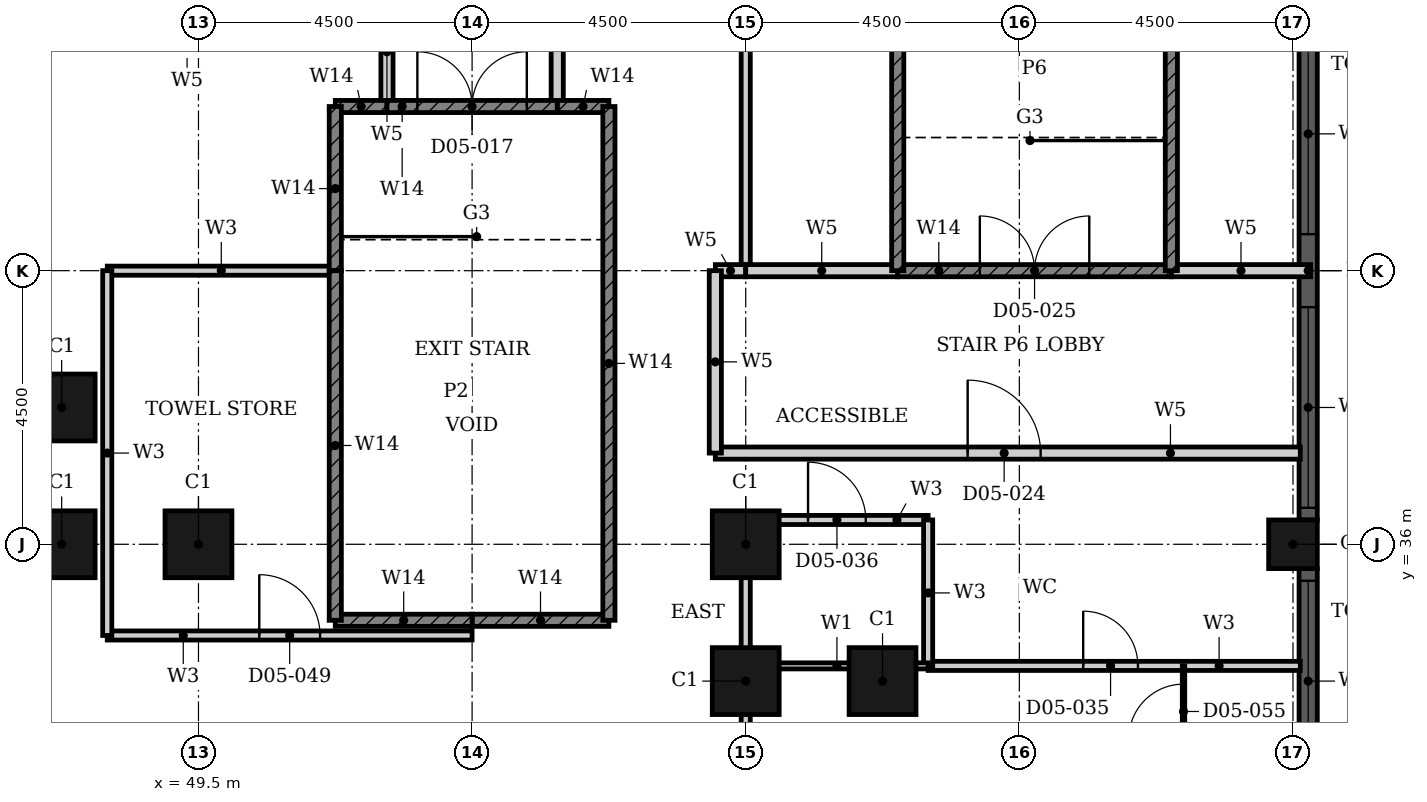
"""IFC4 building model, lengths in metres.
Left out: names, types, materials, properties, quantities, classifications, styles, units other than length and angle.
Written with IfcOpenShell. Run it as: python <this file> out.ifc"""

import sys

from ifc_helpers import new_model, si_unit, direction, frame, frame_2d, origin, origin_2d, place, context, subcontext, project, spatial, rectangle, hollow_rectangle, extrude, element, fill, save


model = new_model("IFC4")
c1 = context("Model", 3, precision=1e-05, world=origin(), true_north=direction((0.0, 1.0)))
c2 = subcontext(c1, "Body", "Model", "MODEL_VIEW")
j1 = project(units=[si_unit("LENGTHUNIT", "METRE"), si_unit("PLANEANGLEUNIT", "RADIAN")], contexts=[c1])
p1 = place(None, origin())
s1 = spatial("IfcSite", under=j1, at=p1, CompositionType="ELEMENT")
p2 = place(p1, origin())
s2 = spatial("IfcBuilding", under=s1, at=p2, CompositionType="ELEMENT")
p3 = place(p2, frame((0.0, 0.0, 28.8)))
s3 = spatial("IfcBuildingStorey", under=s2, at=p3, CompositionType="ELEMENT", Elevation=28.8)
for number, where, z_axis, x_axis in (
    (1, (60.75, 33.75, 0.0), (0.0, 0.0, 1.0), (1.0, 0.0, 0.0)),
    (2, (58.5, 33.75, 0.0), (0.0, 0.0, 1.0), (1.0, 0.0, 0.0)),
    (3, (58.5, 36.0, 0.0), (0.0, 0.0, 1.0), (1.0, 0.0, 0.0)),
    (4, (49.5, 36.0, 0.0), (0.0, 0.0, 1.0), (1.0, 0.0, 0.0)),
    (5, (47.25, 36.0, 0.0), (0.0, 0.0, 1.0), (1.0, 0.0, 0.0)),
    (6, (47.25, 38.25, 0.0), (0.0, 0.0, 1.0), (1.0, 0.0, 0.0)),
):
    element("IfcColumn", number, at=place(p3, frame(where, z_axis=z_axis, x_axis=x_axis)), inside=s3, PredefinedType="COLUMN", context=c2, shape_type="SweptSolid", body=[
        extrude(hollow_rectangle(XDim=1.1, YDim=1.1, WallThickness=0.036, at=origin_2d()), origin(), (0.0, 0.0, 1.0), 4.8),
    ])
p4 = place(p3, frame((67.5, 36.0, 0.0), z_axis=(0.0, 0.0, 1.0), x_axis=(1.0, 0.0, 0.0)))
e7 = element("IfcColumn", 7, at=p4, inside=s3, PredefinedType="COLUMN", context=c2, shape_type="SweptSolid", body=[
    extrude(hollow_rectangle(XDim=0.8, YDim=0.8, WallThickness=0.025, at=origin_2d()), origin(), (0.0, 0.0, 1.0), 4.5),
])
p5 = place(p3, frame((67.75, 27.4, 0.0), z_axis=(0.0, 0.0, 1.0), x_axis=(0.0, 1.0, 0.0)))
e8 = element("IfcWall", 8, at=p5, inside=s3, PredefinedType="SOLIDWALL", context=c2, shape_type="SweptSolid", body=[
    extrude(rectangle(XDim=8.2, YDim=0.3, at=frame_2d((4.1, 0.0))), origin(), (0.0, 0.0, 1.0), 4.8),
])
p6 = place(p5, frame((0.2, 0.0, 0.9)))
e9 = element("IfcOpeningElement", 9, at=p6, cuts=e8, PredefinedType="OPENING", context=c2, shape_type="SweptSolid", body=[
    extrude(rectangle(XDim=3.3, YDim=2.9, at=frame_2d((1.65, 1.45))), frame((0.0, 0.16, 0.0), z_axis=(0.0, -1.0, 0.0), x_axis=(1.0, 0.0, 0.0)), (0.0, 0.0, 1.0), 0.32),
])
p7 = place(p5, frame((4.7, 0.0, 0.9)))
e10 = element("IfcOpeningElement", 10, at=p7, cuts=e8, PredefinedType="OPENING", context=c2, shape_type="SweptSolid", body=[
    extrude(rectangle(XDim=3.3, YDim=2.9, at=frame_2d((1.65, 1.45))), frame((0.0, 0.16, 0.0), z_axis=(0.0, -1.0, 0.0), x_axis=(1.0, 0.0, 0.0)), (0.0, 0.0, 1.0), 0.32),
])
p8 = place(p3, frame((67.75, 36.4, 0.0), z_axis=(0.0, 0.0, 1.0), x_axis=(0.0, 1.0, 0.0)))
e11 = element("IfcWall", 11, at=p8, inside=s3, PredefinedType="SOLIDWALL", context=c2, shape_type="SweptSolid", body=[
    extrude(rectangle(XDim=8.2, YDim=0.3, at=frame_2d((4.1, 0.0))), origin(), (0.0, 0.0, 1.0), 4.8),
])
p9 = place(p8, frame((0.2, 0.0, 0.9)))
e12 = element("IfcOpeningElement", 12, at=p9, cuts=e11, PredefinedType="OPENING", context=c2, shape_type="SweptSolid", body=[
    extrude(rectangle(XDim=3.3, YDim=2.9, at=frame_2d((1.65, 1.45))), frame((0.0, 0.16, 0.0), z_axis=(0.0, -1.0, 0.0), x_axis=(1.0, 0.0, 0.0)), (0.0, 0.0, 1.0), 0.32),
])
p10 = place(p8, frame((4.7, 0.0, 0.9)))
e13 = element("IfcOpeningElement", 13, at=p10, cuts=e11, PredefinedType="OPENING", context=c2, shape_type="SweptSolid", body=[
    extrude(rectangle(XDim=3.3, YDim=2.9, at=frame_2d((1.65, 1.45))), frame((0.0, 0.16, 0.0), z_axis=(0.0, -1.0, 0.0), x_axis=(1.0, 0.0, 0.0)), (0.0, 0.0, 1.0), 0.32),
])
p11 = place(p3, frame((61.5, 34.0, 0.0), z_axis=(0.0, 0.0, 1.0), x_axis=(1.0, 0.0, 0.0)))
e14 = element("IfcWall", 14, at=p11, inside=s3, PredefinedType="PARTITIONING", context=c2, shape_type="SweptSolid", body=[
    extrude(rectangle(XDim=6.12, YDim=0.15, at=frame_2d((3.06, 0.0))), origin(), (0.0, 0.0, 1.0), 4.5),
])
p12 = place(p11, frame((2.55, 0.0, 0.0)))
e15 = element("IfcOpeningElement", 15, at=p12, cuts=e14, PredefinedType="OPENING", context=c2, shape_type="SweptSolid", body=[
    extrude(rectangle(XDim=0.9, YDim=2.1, at=frame_2d((0.45, 1.05))), frame((0.0, 0.085, 0.0), z_axis=(0.0, -1.0, 0.0), x_axis=(1.0, 0.0, 0.0)), (0.0, 0.0, 1.0), 0.17),
])
p13 = place(p3, frame((48.0, 34.5, 0.0), z_axis=(0.0, 0.0, 1.0), x_axis=(1.0, 0.0, 0.0)))
e16 = element("IfcWall", 16, at=p13, inside=s3, PredefinedType="PARTITIONING", context=c2, shape_type="SweptSolid", body=[
    extrude(rectangle(XDim=6.0, YDim=0.15, at=frame_2d((3.0, 0.0))), origin(), (0.0, 0.0, 1.0), 4.5),
])
p14 = place(p13, frame((2.5, 0.0, 0.0)))
e17 = element("IfcOpeningElement", 17, at=p14, cuts=e16, PredefinedType="OPENING", context=c2, shape_type="SweptSolid", body=[
    extrude(rectangle(XDim=1.0, YDim=2.1, at=frame_2d((0.5, 1.05))), frame((0.0, 0.085, 0.0), z_axis=(0.0, -1.0, 0.0), x_axis=(1.0, 0.0, 0.0)), (0.0, 0.0, 1.0), 0.17),
])
p15 = place(p3, frame((58.5, 36.4, 0.0), z_axis=(0.0, 0.0, 1.0), x_axis=(1.0, 0.0, 0.0)))
e18 = element("IfcWall", 18, at=p15, inside=s3, PredefinedType="PARTITIONING", context=c2, shape_type="SweptSolid", body=[
    extrude(rectangle(XDim=3.0, YDim=0.15, at=frame_2d((1.5, 0.0))), origin(), (0.0, 0.0, 1.0), 4.5),
])
p16 = place(p15, frame((1.025, 0.0, 0.0)))
e19 = element("IfcOpeningElement", 19, at=p16, cuts=e18, PredefinedType="OPENING", context=c2, shape_type="SweptSolid", body=[
    extrude(rectangle(XDim=0.95, YDim=2.1, at=frame_2d((0.475, 1.05))), frame((0.0, 0.085, 0.0), z_axis=(0.0, -1.0, 0.0), x_axis=(1.0, 0.0, 0.0)), (0.0, 0.0, 1.0), 0.17),
])
p17 = place(p3, frame((48.0, 40.5, 0.0), z_axis=(0.0, 0.0, 1.0), x_axis=(1.0, 0.0, 0.0)))
e20 = element("IfcWall", 20, at=p17, inside=s3, PredefinedType="PARTITIONING", context=c2, shape_type="SweptSolid", body=[
    extrude(rectangle(XDim=3.75, YDim=0.15, at=frame_2d((1.875, 0.0))), origin(), (0.0, 0.0, 1.0), 4.5),
])
p18 = place(p3, frame((48.0, 34.5, 0.0), z_axis=(0.0, 0.0, 1.0), x_axis=(0.0, 1.0, 0.0)))
e21 = element("IfcWall", 21, at=p18, inside=s3, PredefinedType="PARTITIONING", context=c2, shape_type="SweptSolid", body=[
    extrude(rectangle(XDim=6.0, YDim=0.15, at=frame_2d((3.0, 0.0))), origin(), (0.0, 0.0, 1.0), 4.5),
])
p19 = place(p3, frame((58.5, 29.5, 0.0), z_axis=(0.0, 0.0, 1.0), x_axis=(0.0, 1.0, 0.0)))
e22 = element("IfcWall", 22, at=p19, inside=s3, PredefinedType="PARTITIONING", context=c2, shape_type="SweptSolid", body=[
    extrude(rectangle(XDim=4.5, YDim=0.15, at=frame_2d((2.25, 0.0))), origin(), (0.0, 0.0, 1.0), 4.5),
])
p20 = place(p3, frame((58.5, 34.0, 0.0), z_axis=(0.0, 0.0, 1.0), x_axis=(0.0, 1.0, 0.0)))
e23 = element("IfcWall", 23, at=p20, inside=s3, PredefinedType="PARTITIONING", context=c2, shape_type="SweptSolid", body=[
    extrude(rectangle(XDim=2.4, YDim=0.15, at=frame_2d((1.2, 0.0))), origin(), (0.0, 0.0, 1.0), 3.88),
])
p21 = place(p3, frame((58.5, 40.5, 0.0), z_axis=(0.0, 0.0, 1.0), x_axis=(0.0, 1.0, 0.0)))
e24 = element("IfcWall", 24, at=p21, inside=s3, PredefinedType="PARTITIONING", context=c2, shape_type="SweptSolid", body=[
    extrude(rectangle(XDim=13.69, YDim=0.15, at=frame_2d((6.845, 0.0))), origin(), (0.0, 0.0, 1.0), 4.5),
])
p22 = place(p21, frame((6.25, 0.0, 0.0)))
e25 = element("IfcOpeningElement", 25, at=p22, cuts=e24, PredefinedType="OPENING", context=c2, shape_type="SweptSolid", body=[
    extrude(rectangle(XDim=1.0, YDim=2.1, at=frame_2d((0.5, 1.05))), frame((0.0, 0.085, 0.0), z_axis=(0.0, -1.0, 0.0), x_axis=(1.0, 0.0, 0.0)), (0.0, 0.0, 1.0), 0.17),
])
p23 = place(p3, frame((61.5, 34.0, 0.0), z_axis=(0.0, 0.0, 1.0), x_axis=(0.0, 1.0, 0.0)))
e26 = element("IfcWall", 26, at=p23, inside=s3, PredefinedType="PARTITIONING", context=c2, shape_type="SweptSolid", body=[
    extrude(rectangle(XDim=2.4, YDim=0.15, at=frame_2d((1.2, 0.0))), origin(), (0.0, 0.0, 1.0), 4.5),
])
p24 = place(p3, frame((58.5, 34.0, 0.0), z_axis=(0.0, 0.0, 1.0), x_axis=(1.0, 0.0, 0.0)))
e27 = element("IfcWall", 27, at=p24, inside=s3, PredefinedType="PARTITIONING", context=c2, shape_type="SweptSolid", body=[
    extrude(rectangle(XDim=3.0, YDim=0.1, at=frame_2d((1.5, 0.0))), origin(), (0.0, 0.0, 1.0), 4.5),
])
p25 = place(p3, frame((58.0, 37.5, 0.0), z_axis=(0.0, 0.0, 1.0), x_axis=(1.0, 0.0, 0.0)))
e28 = element("IfcWall", 28, at=p25, inside=s3, PredefinedType="PARTITIONING", context=c2, shape_type="SweptSolid", body=[
    extrude(rectangle(XDim=9.62, YDim=0.2, at=frame_2d((4.81, 0.0))), origin(), (0.0, 0.0, 1.0), 4.5),
])
p26 = place(p25, frame((4.15, 0.0, 0.0)))
e29 = element("IfcOpeningElement", 29, at=p26, cuts=e28, PredefinedType="OPENING", context=c2, shape_type="SweptSolid", body=[
    extrude(rectangle(XDim=1.2, YDim=2.1, at=frame_2d((0.6, 1.05))), frame((0.0, 0.11, 0.0), z_axis=(0.0, -1.0, 0.0), x_axis=(1.0, 0.0, 0.0)), (0.0, 0.0, 1.0), 0.22),
])
p27 = place(p3, frame((58.0, 40.5, 0.0), z_axis=(0.0, 0.0, 1.0), x_axis=(1.0, 0.0, 0.0)))
e30 = element("IfcWall", 30, at=p27, inside=s3, PredefinedType="PARTITIONING", context=c2, shape_type="SweptSolid", body=[
    extrude(rectangle(XDim=0.5, YDim=0.2, at=frame_2d((0.25, 0.0))), origin(), (0.0, 0.0, 1.0), 4.5),
])
p28 = place(p3, frame((58.5, 40.5, 0.0), z_axis=(0.0, 0.0, 1.0), x_axis=(1.0, 0.0, 0.0)))
e31 = element("IfcWall", 31, at=p28, inside=s3, PredefinedType="PARTITIONING", context=c2, shape_type="SweptSolid", body=[
    extrude(rectangle(XDim=2.5, YDim=0.2, at=frame_2d((1.25, 0.0))), origin(), (0.0, 0.0, 1.0), 4.5),
])
p29 = place(p3, frame((65.5, 40.5, 0.0), z_axis=(0.0, 0.0, 1.0), x_axis=(1.0, 0.0, 0.0)))
e32 = element("IfcWall", 32, at=p29, inside=s3, PredefinedType="PARTITIONING", context=c2, shape_type="SweptSolid", body=[
    extrude(rectangle(XDim=2.29, YDim=0.2, at=frame_2d((1.145, 0.0))), origin(), (0.0, 0.0, 1.0), 4.5),
])
p30 = place(p3, frame((52.6, 43.2, 0.0), z_axis=(0.0, 0.0, 1.0), x_axis=(0.0, 1.0, 0.0)))
e33 = element("IfcWall", 33, at=p30, inside=s3, PredefinedType="PARTITIONING", context=c2, shape_type="SweptSolid", body=[
    extrude(rectangle(XDim=1.8, YDim=0.2, at=frame_2d((0.9, 0.0))), origin(), (0.0, 0.0, 1.0), 4.5),
])
p31 = place(p3, frame((55.4, 43.2, 0.0), z_axis=(0.0, 0.0, 1.0), x_axis=(0.0, 1.0, 0.0)))
e34 = element("IfcWall", 34, at=p31, inside=s3, PredefinedType="PARTITIONING", context=c2, shape_type="SweptSolid", body=[
    extrude(rectangle(XDim=10.92, YDim=0.2, at=frame_2d((5.46, 0.0))), origin(), (0.0, 0.0, 1.0), 4.5),
])
p32 = place(p31, frame((4.8, 0.0, 0.0)))
e35 = element("IfcOpeningElement", 35, at=p32, cuts=e34, PredefinedType="OPENING", context=c2, shape_type="SweptSolid", body=[
    extrude(rectangle(XDim=1.2, YDim=2.1, at=frame_2d((0.6, 1.05))), frame((0.0, 0.11, 0.0), z_axis=(0.0, -1.0, 0.0), x_axis=(1.0, 0.0, 0.0)), (0.0, 0.0, 1.0), 0.22),
])
p33 = place(p3, frame((58.0, 37.5, 0.0), z_axis=(0.0, 0.0, 1.0), x_axis=(0.0, 1.0, 0.0)))
e36 = element("IfcWall", 36, at=p33, inside=s3, PredefinedType="PARTITIONING", context=c2, shape_type="SweptSolid", body=[
    extrude(rectangle(XDim=3.0, YDim=0.2, at=frame_2d((1.5, 0.0))), origin(), (0.0, 0.0, 1.0), 4.5),
])
for number, where, z_axis, x_axis in (
    (37, (54.0, 34.75, 0.0), (0.0, 0.0, 1.0), (1.0, 0.0, 0.0)),
    (38, (51.75, 34.75, 0.0), (0.0, 0.0, 1.0), (1.0, 0.0, 0.0)),
):
    element("IfcWall", number, at=place(p3, frame(where, z_axis=z_axis, x_axis=x_axis)), inside=s3, PredefinedType="SHEAR", context=c2, shape_type="SweptSolid", body=[
        extrude(rectangle(XDim=2.25, YDim=0.2, at=frame_2d((1.125, 0.0))), origin(), (0.0, 0.0, 1.0), 4.5),
    ])
p34 = place(p3, frame((61.0, 40.5, 0.0), z_axis=(0.0, 0.0, 1.0), x_axis=(1.0, 0.0, 0.0)))
e39 = element("IfcWall", 39, at=p34, inside=s3, PredefinedType="SHEAR", context=c2, shape_type="SweptSolid", body=[
    extrude(rectangle(XDim=4.5, YDim=0.2, at=frame_2d((2.25, 0.0))), origin(), (0.0, 0.0, 1.0), 4.5),
])
p35 = place(p34, frame((1.35, 0.0, 0.0)))
e40 = element("IfcOpeningElement", 40, at=p35, cuts=e39, PredefinedType="OPENING", context=c2, shape_type="SweptSolid", body=[
    extrude(rectangle(XDim=1.8, YDim=2.1, at=frame_2d((0.9, 1.05))), frame((0.0, 0.11, 0.0), z_axis=(0.0, -1.0, 0.0), x_axis=(1.0, 0.0, 0.0)), (0.0, 0.0, 1.0), 0.22),
])
for number, where, z_axis, x_axis in (
    (41, (51.75, 43.2, 0.0), (0.0, 0.0, 1.0), (1.0, 0.0, 0.0)),
    (42, (55.4, 43.2, 0.0), (0.0, 0.0, 1.0), (1.0, 0.0, 0.0)),
):
    element("IfcWall", number, at=place(p3, frame(where, z_axis=z_axis, x_axis=x_axis)), inside=s3, PredefinedType="SHEAR", context=c2, shape_type="SweptSolid", body=[
        extrude(rectangle(XDim=0.85, YDim=0.2, at=frame_2d((0.425, 0.0))), origin(), (0.0, 0.0, 1.0), 4.5),
    ])
p36 = place(p3, frame((52.6, 43.2, 0.0), z_axis=(0.0, 0.0, 1.0), x_axis=(1.0, 0.0, 0.0)))
e43 = element("IfcWall", 43, at=p36, inside=s3, PredefinedType="SHEAR", context=c2, shape_type="SweptSolid", body=[
    extrude(rectangle(XDim=2.8, YDim=0.2, at=frame_2d((1.4, 0.0))), origin(), (0.0, 0.0, 1.0), 4.5),
])
p37 = place(p36, frame((0.5, 0.0, 0.0)))
e44 = element("IfcOpeningElement", 44, at=p37, cuts=e43, PredefinedType="OPENING", context=c2, shape_type="SweptSolid", body=[
    extrude(rectangle(XDim=1.8, YDim=2.1, at=frame_2d((0.9, 1.05))), frame((0.0, 0.11, 0.0), z_axis=(0.0, -1.0, 0.0), x_axis=(1.0, 0.0, 0.0)), (0.0, 0.0, 1.0), 0.22),
])
p38 = place(p3, frame((51.75, 40.5, 0.0), z_axis=(0.0, 0.0, 1.0), x_axis=(0.0, 1.0, 0.0)))
e45 = element("IfcWall", 45, at=p38, inside=s3, PredefinedType="SHEAR", context=c2, shape_type="SweptSolid", body=[
    extrude(rectangle(XDim=2.7, YDim=0.2, at=frame_2d((1.35, 0.0))), origin(), (0.0, 0.0, 1.0), 4.5),
])
p39 = place(p3, frame((51.75, 34.75, 0.0), z_axis=(0.0, 0.0, 1.0), x_axis=(0.0, 1.0, 0.0)))
e46 = element("IfcWall", 46, at=p39, inside=s3, PredefinedType="SHEAR", context=c2, shape_type="SweptSolid", body=[
    extrude(rectangle(XDim=5.75, YDim=0.2, at=frame_2d((2.875, 0.0))), origin(), (0.0, 0.0, 1.0), 4.5),
])
for number, where, z_axis, x_axis in (
    (47, (56.25, 34.75, 0.0), (0.0, 0.0, 1.0), (0.0, 1.0, 0.0)),
    (48, (61.0, 40.5, 0.0), (0.0, 0.0, 1.0), (0.0, 1.0, 0.0)),
    (49, (65.5, 40.5, 0.0), (0.0, 0.0, 1.0), (0.0, 1.0, 0.0)),
):
    element("IfcWall", number, at=place(p3, frame(where, z_axis=z_axis, x_axis=x_axis)), inside=s3, PredefinedType="SHEAR", context=c2, shape_type="SweptSolid", body=[
        extrude(rectangle(XDim=8.45, YDim=0.2, at=frame_2d((4.225, 0.0))), origin(), (0.0, 0.0, 1.0), 4.5),
    ])
p40 = place(p3, frame((65.7, 29.5, 0.0), z_axis=(0.0, 0.0, 1.0), x_axis=(0.0, 1.0, 0.0)))
e50 = element("IfcWall", 50, at=p40, inside=s3, PredefinedType="PARTITIONING", context=c2, shape_type="SweptSolid", body=[
    extrude(rectangle(XDim=4.5, YDim=0.04, at=frame_2d((2.25, 0.0))), origin(), (0.0, 0.0, 1.0), 4.5),
])
p41 = place(p40, frame((0.4, 0.0, 0.0)))
e51 = element("IfcOpeningElement", 51, at=p41, cuts=e50, PredefinedType="OPENING", context=c2, shape_type="SweptSolid", body=[
    extrude(rectangle(XDim=0.7, YDim=2.0, at=frame_2d((0.35, 1.0))), frame((0.0, 0.03, 0.0), z_axis=(0.0, -1.0, 0.0), x_axis=(1.0, 0.0, 0.0)), (0.0, 0.0, 1.0), 0.06),
])
p42 = place(p40, frame((1.9, 0.0, 0.0)))
e52 = element("IfcOpeningElement", 52, at=p42, cuts=e50, PredefinedType="OPENING", context=c2, shape_type="SweptSolid", body=[
    extrude(rectangle(XDim=0.7, YDim=2.0, at=frame_2d((0.35, 1.0))), frame((0.0, 0.03, 0.0), z_axis=(0.0, -1.0, 0.0), x_axis=(1.0, 0.0, 0.0)), (0.0, 0.0, 1.0), 0.06),
])
p43 = place(p40, frame((3.3, 0.0, 0.0)))
e53 = element("IfcOpeningElement", 53, at=p43, cuts=e50, PredefinedType="OPENING", context=c2, shape_type="SweptSolid", body=[
    extrude(rectangle(XDim=0.9, YDim=2.0, at=frame_2d((0.45, 1.0))), frame((0.0, 0.03, 0.0), z_axis=(0.0, -1.0, 0.0), x_axis=(1.0, 0.0, 0.0)), (0.0, 0.0, 1.0), 0.06),
])
p44 = place(p7, origin())
e54 = element("IfcWindow", 54, at=p44, inside=s3, PartitioningType="SINGLE_PANEL", PredefinedType="WINDOW", context=c2, shape_type="SweptSolid", body=[
    extrude(rectangle(XDim=3.3, YDim=2.9, at=frame_2d((1.65, 1.45))), frame((0.0, 0.03, 0.0), z_axis=(0.0, -1.0, 0.0), x_axis=(1.0, 0.0, 0.0)), (0.0, 0.0, 1.0), 0.06),
])
fill(e10, e54)
p45 = place(p9, origin())
e55 = element("IfcWindow", 55, at=p45, inside=s3, PartitioningType="SINGLE_PANEL", PredefinedType="WINDOW", context=c2, shape_type="SweptSolid", body=[
    extrude(rectangle(XDim=3.3, YDim=2.9, at=frame_2d((1.65, 1.45))), frame((0.0, 0.03, 0.0), z_axis=(0.0, -1.0, 0.0), x_axis=(1.0, 0.0, 0.0)), (0.0, 0.0, 1.0), 0.06),
])
fill(e12, e55)
p46 = place(p10, origin())
e56 = element("IfcWindow", 56, at=p46, inside=s3, PartitioningType="SINGLE_PANEL", PredefinedType="WINDOW", context=c2, shape_type="SweptSolid", body=[
    extrude(rectangle(XDim=3.3, YDim=2.9, at=frame_2d((1.65, 1.45))), frame((0.0, 0.03, 0.0), z_axis=(0.0, -1.0, 0.0), x_axis=(1.0, 0.0, 0.0)), (0.0, 0.0, 1.0), 0.06),
])
fill(e13, e56)
p47 = place(p37, origin())
e57 = element("IfcDoor", 57, at=p47, inside=s3, OperationType="DOUBLE_DOOR_SINGLE_SWING", PredefinedType="DOOR", context=c2, shape_type="SweptSolid", body=[
    extrude(rectangle(XDim=1.8, YDim=2.1, at=frame_2d((0.9, 1.05))), frame((0.0, 0.025, 0.0), z_axis=(0.0, -1.0, 0.0), x_axis=(1.0, 0.0, 0.0)), (0.0, 0.0, 1.0), 0.05),
])
fill(e44, e57)
p48 = place(p26, origin())
e58 = element("IfcDoor", 58, at=p48, inside=s3, OperationType="SINGLE_SWING_RIGHT", PredefinedType="DOOR", context=c2, shape_type="SweptSolid", body=[
    extrude(rectangle(XDim=1.2, YDim=2.1, at=frame_2d((0.6, 1.05))), frame((0.0, 0.025, 0.0), z_axis=(0.0, -1.0, 0.0), x_axis=(1.0, 0.0, 0.0)), (0.0, 0.0, 1.0), 0.05),
])
fill(e29, e58)
p49 = place(p35, origin())
e59 = element("IfcDoor", 59, at=p49, inside=s3, OperationType="DOUBLE_DOOR_SINGLE_SWING", PredefinedType="DOOR", context=c2, shape_type="SweptSolid", body=[
    extrude(rectangle(XDim=1.8, YDim=2.1, at=frame_2d((0.9, 1.05))), frame((0.0, 0.025, 0.0), z_axis=(0.0, -1.0, 0.0), x_axis=(1.0, 0.0, 0.0)), (0.0, 0.0, 1.0), 0.05),
])
fill(e40, e59)
p50 = place(p12, origin())
e60 = element("IfcDoor", 60, at=p50, inside=s3, OperationType="SINGLE_SWING_RIGHT", PredefinedType="DOOR", context=c2, shape_type="SweptSolid", body=[
    extrude(rectangle(XDim=0.9, YDim=2.1, at=frame_2d((0.45, 1.05))), frame((0.0, 0.025, 0.0), z_axis=(0.0, -1.0, 0.0), x_axis=(1.0, 0.0, 0.0)), (0.0, 0.0, 1.0), 0.05),
])
fill(e15, e60)
p51 = place(p16, origin())
e61 = element("IfcDoor", 61, at=p51, inside=s3, OperationType="SINGLE_SWING_RIGHT", PredefinedType="DOOR", context=c2, shape_type="SweptSolid", body=[
    extrude(rectangle(XDim=0.95, YDim=2.1, at=frame_2d((0.475, 1.05))), frame((0.0, 0.025, 0.0), z_axis=(0.0, -1.0, 0.0), x_axis=(1.0, 0.0, 0.0)), (0.0, 0.0, 1.0), 0.05),
])
fill(e19, e61)
p52 = place(p14, origin())
e62 = element("IfcDoor", 62, at=p52, inside=s3, OperationType="SINGLE_SWING_RIGHT", PredefinedType="DOOR", context=c2, shape_type="SweptSolid", body=[
    extrude(rectangle(XDim=1.0, YDim=2.1, at=frame_2d((0.5, 1.05))), frame((0.0, 0.025, 0.0), z_axis=(0.0, -1.0, 0.0), x_axis=(1.0, 0.0, 0.0)), (0.0, 0.0, 1.0), 0.05),
])
fill(e17, e62)
p53 = place(p43, origin())
e63 = element("IfcDoor", 63, at=p53, inside=s3, OperationType="SINGLE_SWING_RIGHT", PredefinedType="DOOR", context=c2, shape_type="SweptSolid", body=[
    extrude(rectangle(XDim=0.9, YDim=2.0, at=frame_2d((0.45, 1.0))), frame((0.0, 0.02, 0.0), z_axis=(0.0, -1.0, 0.0), x_axis=(1.0, 0.0, 0.0)), (0.0, 0.0, 1.0), 0.04),
])
fill(e53, e63)
save(model, sys.argv[1])
